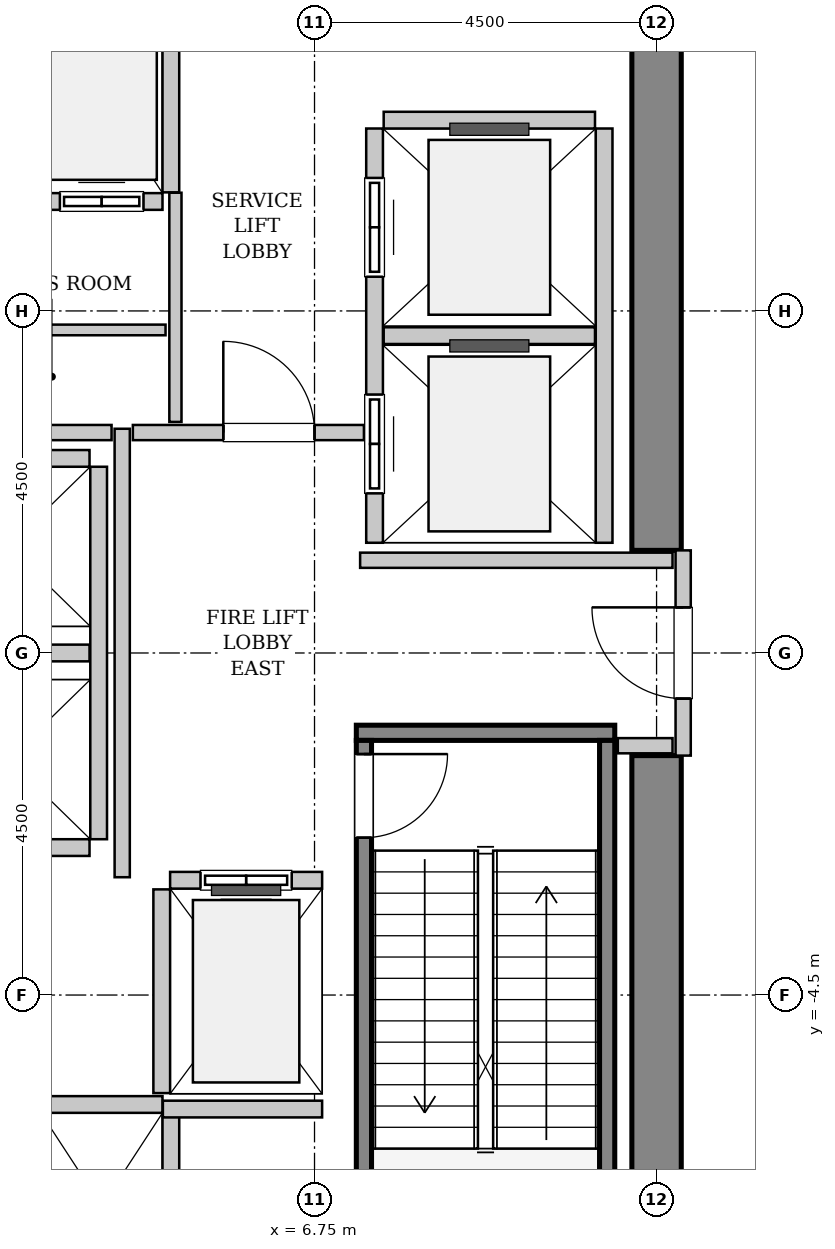
"""IFC4 building model, lengths in metres.
Left out: names, types, materials, properties, quantities, classifications, styles, units other than length and angle.
Written with IfcOpenShell. Run it as: python <this file> out.ifc"""

import sys

from ifc_helpers import new_model, si_unit, direction, frame, frame_2d, origin, place, context, subcontext, project, spatial, rectangle, extrude, source, transform, mapped, element, fill, save


model = new_model("IFC4")
c1 = context("Model", 3, precision=1e-05, world=origin(), true_north=direction((0.0, 1.0)))
c2 = subcontext(c1, "Body", "Model", "MODEL_VIEW")
j1 = project(units=[si_unit("LENGTHUNIT", "METRE"), si_unit("PLANEANGLEUNIT", "RADIAN")], contexts=[c1])
p1 = place(None, origin())
s1 = spatial("IfcSite", under=j1, at=p1, CompositionType="ELEMENT")
p2 = place(p1, origin())
s2 = spatial("IfcBuilding", under=s1, at=p2, CompositionType="ELEMENT")
p3 = place(p2, frame((0.0, 0.0, 22.2)))
s3 = spatial("IfcBuildingStorey", under=s2, at=p3, CompositionType="ELEMENT", Elevation=22.2)
m1 = source(origin(), c2, "Body", "SweptSolid", [
    extrude(rectangle(XDim=7.325, YDim=0.65, at=frame_2d((3.663, 0.0))), origin(), (0.0, 0.0, 1.0), 5.4),
])
for number, where, z_axis, x_axis in (
    (1, (11.25, -8.675, 0.0), (0.0, 0.0, 1.0), (0.0, 1.0, 0.0)),
    (2, (11.25, 1.35, 0.0), (0.0, 0.0, 1.0), (0.0, 1.0, 0.0)),
):
    element("IfcWall", number, at=place(p3, frame(where, z_axis=z_axis, x_axis=x_axis)), inside=s3, PredefinedType="SHEAR", context=c2, shape_type="MappedRepresentation", body=[
        mapped(m1, transform((0.0, 0.0, 0.0), x_axis=(1.0, 0.0, 0.0), y_axis=(0.0, 1.0, 0.0), z_axis=(0.0, 0.0, 1.0), scale=1.0)),
    ])
m2 = source(origin(), c2, "Body", "SweptSolid", [
    extrude(rectangle(XDim=3.4, YDim=0.2, at=frame_2d((1.7, 0.0))), origin(), (0.0, 0.0, 1.0), 5.4),
])
p4 = place(p3, frame((7.3, -1.05, 0.0), z_axis=(0.0, 0.0, 1.0), x_axis=(1.0, 0.0, 0.0)))
e3 = element("IfcWall", 3, at=p4, inside=s3, PredefinedType="SOLIDWALL", context=c2, shape_type="MappedRepresentation", body=[
    mapped(m2, transform((0.0, 0.0, 0.0), x_axis=(1.0, 0.0, 0.0), y_axis=(0.0, 1.0, 0.0), z_axis=(0.0, 0.0, 1.0), scale=1.0)),
])
m3 = source(origin(), c2, "Body", "SweptSolid", [
    extrude(rectangle(XDim=7.1, YDim=0.2, at=frame_2d((3.55, 0.0))), origin(), (0.0, 0.0, 1.0), 5.4),
])
p5 = place(p3, frame((7.4, -1.15, 0.0), z_axis=(0.0, 0.0, 1.0), x_axis=(0.0, -1.0, 0.0)))
e4 = element("IfcWall", 4, at=p5, inside=s3, PredefinedType="SOLIDWALL", context=c2, shape_type="MappedRepresentation", body=[
    mapped(m3, transform((0.0, 0.0, 0.0), x_axis=(1.0, 0.0, 0.0), y_axis=(0.0, 1.0, 0.0), z_axis=(0.0, 0.0, 1.0), scale=1.0)),
])
p6 = place(p5, frame((0.18, 0.0, 0.0)))
e5 = element("IfcOpeningElement", 5, at=p6, cuts=e4, PredefinedType="OPENING", context=c2, shape_type="SweptSolid", body=[
    extrude(rectangle(XDim=1.1, YDim=2.15, at=frame_2d((0.55, 1.075))), frame((0.0, 0.11, 0.0), z_axis=(0.0, -1.0, 0.0), x_axis=(1.0, 0.0, 0.0)), (0.0, 0.0, 1.0), 0.22),
])
p7 = place(p3, frame((10.6, -1.15, 0.0), z_axis=(0.0, 0.0, 1.0), x_axis=(0.0, -1.0, 0.0)))
e6 = element("IfcWall", 6, at=p7, inside=s3, PredefinedType="SOLIDWALL", context=c2, shape_type="MappedRepresentation", body=[
    mapped(m3, transform((0.0, 0.0, 0.0), x_axis=(1.0, 0.0, 0.0), y_axis=(0.0, 1.0, 0.0), z_axis=(0.0, 0.0, 1.0), scale=1.0)),
])
m4 = source(origin(), c2, "Body", "SweptSolid", [
    extrude(rectangle(XDim=2.0, YDim=0.22, at=frame_2d((1.0, 0.0))), origin(), (0.0, 0.0, 1.0), 4.905),
])
p8 = place(p3, frame((6.85, -2.99, 0.0), z_axis=(0.0, 0.0, 1.0), x_axis=(-1.0, 0.0, 0.0)))
e7 = element("IfcWall", 7, at=p8, inside=s3, PredefinedType="SOLIDWALL", context=c2, shape_type="MappedRepresentation", body=[
    mapped(m4, transform((0.0, 0.0, 0.0), x_axis=(1.0, 0.0, 0.0), y_axis=(0.0, 1.0, 0.0), z_axis=(0.0, 0.0, 1.0), scale=1.0)),
])
p9 = place(p8, frame((0.4, 0.0, 0.0)))
e8 = element("IfcOpeningElement", 8, at=p9, cuts=e7, PredefinedType="OPENING", context=c2, shape_type="SweptSolid", body=[
    extrude(rectangle(XDim=1.2, YDim=2.2, at=frame_2d((0.6, 1.1))), frame((0.0, 0.12, 0.0), z_axis=(0.0, -1.0, 0.0), x_axis=(1.0, 0.0, 0.0)), (0.0, 0.0, 1.0), 0.24),
])
m5 = source(origin(), c2, "Body", "SweptSolid", [
    extrude(rectangle(XDim=2.68, YDim=0.22, at=frame_2d((1.34, 0.0))), origin(), (0.0, 0.0, 1.0), 4.905),
])
p10 = place(p3, frame((4.74, -3.11, 0.0), z_axis=(0.0, 0.0, 1.0), x_axis=(0.0, -1.0, 0.0)))
e9 = element("IfcWall", 9, at=p10, inside=s3, PredefinedType="SOLIDWALL", context=c2, shape_type="MappedRepresentation", body=[
    mapped(m5, transform((0.0, 0.0, 0.0), x_axis=(1.0, 0.0, 0.0), y_axis=(0.0, 1.0, 0.0), z_axis=(0.0, 0.0, 1.0), scale=1.0)),
])
m6 = source(origin(), c2, "Body", "SweptSolid", [
    extrude(rectangle(XDim=5.45, YDim=0.22, at=frame_2d((2.725, 0.0))), origin(), (0.0, 0.0, 1.0), 4.905),
])
p11 = place(p3, frame((7.54, 6.9, 0.0), z_axis=(0.0, 0.0, 1.0), x_axis=(0.0, -1.0, 0.0)))
e10 = element("IfcWall", 10, at=p11, inside=s3, PredefinedType="SOLIDWALL", context=c2, shape_type="MappedRepresentation", body=[
    mapped(m6, transform((0.0, 0.0, 0.0), x_axis=(1.0, 0.0, 0.0), y_axis=(0.0, 1.0, 0.0), z_axis=(0.0, 0.0, 1.0), scale=1.0)),
])
p12 = place(p11, frame((3.5, 0.0, 0.0)))
e11 = element("IfcOpeningElement", 11, at=p12, cuts=e10, PredefinedType="OPENING", context=c2, shape_type="SweptSolid", body=[
    extrude(rectangle(XDim=1.3, YDim=2.3, at=frame_2d((0.65, 1.15))), frame((0.0, 0.12, 0.0), z_axis=(0.0, -1.0, 0.0), x_axis=(1.0, 0.0, 0.0)), (0.0, 0.0, 1.0), 0.24),
])
p13 = place(p11, frame((0.65, 0.0, 0.0)))
e12 = element("IfcOpeningElement", 12, at=p13, cuts=e10, PredefinedType="OPENING", context=c2, shape_type="SweptSolid", body=[
    extrude(rectangle(XDim=1.3, YDim=2.3, at=frame_2d((0.65, 1.15))), frame((0.0, 0.12, 0.0), z_axis=(0.0, -1.0, 0.0), x_axis=(1.0, 0.0, 0.0)), (0.0, 0.0, 1.0), 0.24),
])
p14 = place(p3, frame((10.56, 1.45, 0.0), z_axis=(0.0, 0.0, 1.0), x_axis=(0.0, 1.0, 0.0)))
e13 = element("IfcWall", 13, at=p14, inside=s3, PredefinedType="SOLIDWALL", context=c2, shape_type="MappedRepresentation", body=[
    mapped(m6, transform((0.0, 0.0, 0.0), x_axis=(1.0, 0.0, 0.0), y_axis=(0.0, 1.0, 0.0), z_axis=(0.0, 0.0, 1.0), scale=1.0)),
])
m7 = source(origin(), c2, "Body", "SweptSolid", [
    extrude(rectangle(XDim=2.78, YDim=0.22, at=frame_2d((1.39, 0.0))), origin(), (0.0, 0.0, 1.0), 4.905),
])
for number, where, z_axis, x_axis in (
    (14, (7.66, 4.175, 0.0), (0.0, 0.0, 1.0), (1.0, 0.0, 0.0)),
    (15, (10.44, 7.01, 0.0), (0.0, 0.0, 1.0), (-1.0, 0.0, 0.0)),
):
    element("IfcWall", number, at=place(p3, frame(where, z_axis=z_axis, x_axis=x_axis)), inside=s3, PredefinedType="SOLIDWALL", context=c2, shape_type="MappedRepresentation", body=[
        mapped(m7, transform((0.0, 0.0, 0.0), x_axis=(1.0, 0.0, 0.0), y_axis=(0.0, 1.0, 0.0), z_axis=(0.0, 0.0, 1.0), scale=1.0)),
    ])
m8 = source(origin(), c2, "Body", "SweptSolid", [
    extrude(rectangle(XDim=3.2, YDim=0.22, at=frame_2d((1.6, 0.0))), origin(), (0.0, 0.0, 1.0), 4.905),
])
p15 = place(p3, frame((1.55, 5.94, 0.0), z_axis=(0.0, 0.0, 1.0), x_axis=(1.0, 0.0, 0.0)))
e16 = element("IfcWall", 16, at=p15, inside=s3, PredefinedType="SOLIDWALL", context=c2, shape_type="MappedRepresentation", body=[
    mapped(m8, transform((0.0, 0.0, 0.0), x_axis=(1.0, 0.0, 0.0), y_axis=(0.0, 1.0, 0.0), z_axis=(0.0, 0.0, 1.0), scale=1.0)),
])
p16 = place(p15, frame((0.225, 0.0, 0.0)))
e17 = element("IfcOpeningElement", 17, at=p16, cuts=e16, PredefinedType="OPENING", context=c2, shape_type="SweptSolid", body=[
    extrude(rectangle(XDim=1.1, YDim=2.2, at=frame_2d((0.55, 1.1))), frame((0.0, 0.12, 0.0), z_axis=(0.0, -1.0, 0.0), x_axis=(1.0, 0.0, 0.0)), (0.0, 0.0, 1.0), 0.24),
])
p17 = place(p15, frame((1.85, 0.0, 0.0)))
e18 = element("IfcOpeningElement", 18, at=p17, cuts=e16, PredefinedType="OPENING", context=c2, shape_type="SweptSolid", body=[
    extrude(rectangle(XDim=1.1, YDim=2.2, at=frame_2d((0.55, 1.1))), frame((0.0, 0.12, 0.0), z_axis=(0.0, -1.0, 0.0), x_axis=(1.0, 0.0, 0.0)), (0.0, 0.0, 1.0), 0.24),
])
m9 = source(origin(), c2, "Body", "SweptSolid", [
    extrude(rectangle(XDim=2.43, YDim=0.22, at=frame_2d((1.215, 0.0))), origin(), (0.0, 0.0, 1.0), 4.905),
])
p18 = place(p3, frame((4.86, 6.06, 0.0), z_axis=(0.0, 0.0, 1.0), x_axis=(0.0, 1.0, 0.0)))
e19 = element("IfcWall", 19, at=p18, inside=s3, PredefinedType="SOLIDWALL", context=c2, shape_type="MappedRepresentation", body=[
    mapped(m9, transform((0.0, 0.0, 0.0), x_axis=(1.0, 0.0, 0.0), y_axis=(0.0, 1.0, 0.0), z_axis=(0.0, 0.0, 1.0), scale=1.0)),
])
p19 = place(p3, frame((4.75, -5.94, 0.0), z_axis=(0.0, 0.0, 1.0), x_axis=(-1.0, 0.0, 0.0)))
e20 = element("IfcWall", 20, at=p19, inside=s3, PredefinedType="SOLIDWALL", context=c2, shape_type="MappedRepresentation", body=[
    mapped(m8, transform((0.0, 0.0, 0.0), x_axis=(1.0, 0.0, 0.0), y_axis=(0.0, 1.0, 0.0), z_axis=(0.0, 0.0, 1.0), scale=1.0)),
])
p20 = place(p3, frame((4.86, -8.49, 0.0), z_axis=(0.0, 0.0, 1.0), x_axis=(0.0, 1.0, 0.0)))
e21 = element("IfcWall", 21, at=p20, inside=s3, PredefinedType="SOLIDWALL", context=c2, shape_type="MappedRepresentation", body=[
    mapped(m9, transform((0.0, 0.0, 0.0), x_axis=(1.0, 0.0, 0.0), y_axis=(0.0, 1.0, 0.0), z_axis=(0.0, 0.0, 1.0), scale=1.0)),
])
m10 = source(origin(), c2, "Body", "SweptSolid", [
    extrude(rectangle(XDim=4.9, YDim=0.22, at=frame_2d((2.45, 0.0))), origin(), (0.0, 0.0, 1.0), 4.905),
])
p21 = place(p3, frame((3.91, -2.45, 0.0), z_axis=(0.0, 0.0, 1.0), x_axis=(0.0, 1.0, 0.0)))
e22 = element("IfcWall", 22, at=p21, inside=s3, PredefinedType="SOLIDWALL", context=c2, shape_type="MappedRepresentation", body=[
    mapped(m10, transform((0.0, 0.0, 0.0), x_axis=(1.0, 0.0, 0.0), y_axis=(0.0, 1.0, 0.0), z_axis=(0.0, 0.0, 1.0), scale=1.0)),
])
m11 = source(origin(), c2, "Body", "SweptSolid", [
    extrude(rectangle(XDim=2.13, YDim=0.22, at=frame_2d((1.065, 0.0))), origin(), (0.0, 0.0, 1.0), 4.905),
])
for number, where, z_axis, x_axis in (
    (23, (1.66, -2.56, 0.0), (0.0, 0.0, 1.0), (1.0, 0.0, 0.0)),
    (24, (1.66, 0.0, 0.0), (0.0, 0.0, 1.0), (1.0, 0.0, 0.0)),
    (25, (3.79, 2.56, 0.0), (0.0, 0.0, 1.0), (-1.0, 0.0, 0.0)),
):
    element("IfcWall", number, at=place(p3, frame(where, z_axis=z_axis, x_axis=x_axis)), inside=s3, PredefinedType="SOLIDWALL", context=c2, shape_type="MappedRepresentation", body=[
        mapped(m11, transform((0.0, 0.0, 0.0), x_axis=(1.0, 0.0, 0.0), y_axis=(0.0, 1.0, 0.0), z_axis=(0.0, 0.0, 1.0), scale=1.0)),
    ])
m12 = source(origin(), c2, "Body", "SweptSolid", [
    extrude(rectangle(XDim=2.095, YDim=0.22, at=frame_2d((1.048, 0.0))), origin(), (0.0, 0.0, 1.0), 4.905),
])
p22 = place(p3, frame((4.755, -6.0, 0.0), z_axis=(0.0, 0.0, 1.0), x_axis=(1.0, 0.0, 0.0)))
e26 = element("IfcWall", 26, at=p22, inside=s3, PredefinedType="SOLIDWALL", context=c2, shape_type="MappedRepresentation", body=[
    mapped(m12, transform((0.0, 0.0, 0.0), x_axis=(1.0, 0.0, 0.0), y_axis=(0.0, 1.0, 0.0), z_axis=(0.0, 0.0, 1.0), scale=1.0)),
])
m13 = source(origin(), c2, "Body", "SweptSolid", [
    extrude(rectangle(XDim=2.7, YDim=0.2, at=frame_2d((1.35, 0.0))), origin(), (0.0, 0.0, 1.0), 3.795),
])
p23 = place(p3, frame((11.6, -1.35, 0.0), z_axis=(0.0, 0.0, 1.0), x_axis=(0.0, 1.0, 0.0)))
e27 = element("IfcWall", 27, at=p23, inside=s3, PredefinedType="PARTITIONING", context=c2, shape_type="MappedRepresentation", body=[
    mapped(m13, transform((0.0, 0.0, 0.0), x_axis=(1.0, 0.0, 0.0), y_axis=(0.0, 1.0, 0.0), z_axis=(0.0, 0.0, 1.0), scale=1.0)),
])
p24 = place(p23, frame((0.75, 0.0, 0.0)))
e28 = element("IfcOpeningElement", 28, at=p24, cuts=e27, PredefinedType="OPENING", context=c2, shape_type="SweptSolid", body=[
    extrude(rectangle(XDim=1.2, YDim=2.15, at=frame_2d((0.6, 1.075))), frame((0.0, 0.11, 0.0), z_axis=(0.0, -1.0, 0.0), x_axis=(1.0, 0.0, 0.0)), (0.0, 0.0, 1.0), 0.22),
])
m14 = source(origin(), c2, "Body", "SweptSolid", [
    extrude(rectangle(XDim=5.9, YDim=0.2, at=frame_2d((2.95, 0.0))), origin(), (0.0, 0.0, 1.0), 4.905),
])
p25 = place(p3, frame((4.22, -2.95, 0.0), z_axis=(0.0, 0.0, 1.0), x_axis=(0.0, 1.0, 0.0)))
e29 = element("IfcWall", 29, at=p25, inside=s3, PredefinedType="PARTITIONING", context=c2, shape_type="MappedRepresentation", body=[
    mapped(m14, transform((0.0, 0.0, 0.0), x_axis=(1.0, 0.0, 0.0), y_axis=(0.0, 1.0, 0.0), z_axis=(0.0, 0.0, 1.0), scale=1.0)),
])
m15 = source(origin(), c2, "Body", "SweptSolid", [
    extrude(rectangle(XDim=2.52, YDim=0.2, at=frame_2d((1.26, 0.0))), origin(), (0.0, 0.0, 1.0), 4.905),
])
p26 = place(p3, frame((1.56, 2.9, 0.0), z_axis=(0.0, 0.0, 1.0), x_axis=(1.0, 0.0, 0.0)))
e30 = element("IfcWall", 30, at=p26, inside=s3, PredefinedType="PARTITIONING", context=c2, shape_type="MappedRepresentation", body=[
    mapped(m15, transform((0.0, 0.0, 0.0), x_axis=(1.0, 0.0, 0.0), y_axis=(0.0, 1.0, 0.0), z_axis=(0.0, 0.0, 1.0), scale=1.0)),
])
m16 = source(origin(), c2, "Body", "SweptSolid", [
    extrude(rectangle(XDim=3.04, YDim=0.2, at=frame_2d((1.52, 0.0))), origin(), (0.0, 0.0, 1.0), 4.905),
])
p27 = place(p3, frame((4.36, 2.9, 0.0), z_axis=(0.0, 0.0, 1.0), x_axis=(1.0, 0.0, 0.0)))
e31 = element("IfcWall", 31, at=p27, inside=s3, PredefinedType="PARTITIONING", context=c2, shape_type="MappedRepresentation", body=[
    mapped(m16, transform((0.0, 0.0, 0.0), x_axis=(1.0, 0.0, 0.0), y_axis=(0.0, 1.0, 0.0), z_axis=(0.0, 0.0, 1.0), scale=1.0)),
])
p28 = place(p27, frame((1.19, 0.0, 0.0)))
e32 = element("IfcOpeningElement", 32, at=p28, cuts=e31, PredefinedType="OPENING", context=c2, shape_type="SweptSolid", body=[
    extrude(rectangle(XDim=1.2, YDim=2.15, at=frame_2d((0.6, 1.075))), frame((0.0, 0.11, 0.0), z_axis=(0.0, -1.0, 0.0), x_axis=(1.0, 0.0, 0.0)), (0.0, 0.0, 1.0), 0.22),
])
m17 = source(origin(), c2, "Body", "SweptSolid", [
    extrude(rectangle(XDim=4.11, YDim=0.2, at=frame_2d((2.055, 0.0))), origin(), (0.0, 0.0, 1.0), 4.905),
])
p29 = place(p3, frame((7.35, 1.22, 0.0), z_axis=(0.0, 0.0, 1.0), x_axis=(1.0, 0.0, 0.0)))
e33 = element("IfcWall", 33, at=p29, inside=s3, PredefinedType="PARTITIONING", context=c2, shape_type="MappedRepresentation", body=[
    mapped(m17, transform((0.0, 0.0, 0.0), x_axis=(1.0, 0.0, 0.0), y_axis=(0.0, 1.0, 0.0), z_axis=(0.0, 0.0, 1.0), scale=1.0)),
])
m18 = source(origin(), c2, "Body", "SweptSolid", [
    extrude(rectangle(XDim=0.72, YDim=0.2, at=frame_2d((0.36, 0.0))), origin(), (0.0, 0.0, 1.0), 4.905),
])
p30 = place(p3, frame((10.74, -1.22, 0.0), z_axis=(0.0, 0.0, 1.0), x_axis=(1.0, 0.0, 0.0)))
e34 = element("IfcWall", 34, at=p30, inside=s3, PredefinedType="PARTITIONING", context=c2, shape_type="MappedRepresentation", body=[
    mapped(m18, transform((0.0, 0.0, 0.0), x_axis=(1.0, 0.0, 0.0), y_axis=(0.0, 1.0, 0.0), z_axis=(0.0, 0.0, 1.0), scale=1.0)),
])
m19 = source(origin(), c2, "Body", "SweptSolid", [
    extrude(rectangle(XDim=3.015, YDim=0.16, at=frame_2d((1.507, 0.0))), origin(), (0.0, 0.0, 1.0), 4.905),
])
p31 = place(p3, frame((4.92, 3.04, 0.0), z_axis=(0.0, 0.0, 1.0), x_axis=(0.0, 1.0, 0.0)))
e35 = element("IfcWall", 35, at=p31, inside=s3, PredefinedType="PARTITIONING", context=c2, shape_type="MappedRepresentation", body=[
    mapped(m19, transform((0.0, 0.0, 0.0), x_axis=(1.0, 0.0, 0.0), y_axis=(0.0, 1.0, 0.0), z_axis=(0.0, 0.0, 1.0), scale=1.0)),
])
m20 = source(origin(), c2, "Body", "SweptSolid", [
    extrude(rectangle(XDim=3.15, YDim=0.14, at=frame_2d((1.575, 0.0))), origin(), (0.0, 0.0, 1.0), 4.905),
])
p32 = place(p3, frame((1.64, 4.25, 0.0), z_axis=(0.0, 0.0, 1.0), x_axis=(1.0, 0.0, 0.0)))
e36 = element("IfcWall", 36, at=p32, inside=s3, PredefinedType="PARTITIONING", context=c2, shape_type="MappedRepresentation", body=[
    mapped(m20, transform((0.0, 0.0, 0.0), x_axis=(1.0, 0.0, 0.0), y_axis=(0.0, 1.0, 0.0), z_axis=(0.0, 0.0, 1.0), scale=1.0)),
])
m21 = source(origin(), c2, "Body", "SweptSolid", [
    extrude(rectangle(XDim=1.1, YDim=2.15, at=frame_2d((0.55, 1.075))), frame((0.0, 0.025, 0.0), z_axis=(0.0, -1.0, 0.0), x_axis=(1.0, 0.0, 0.0)), (0.0, 0.0, 1.0), 0.05),
])
p33 = place(p6, origin())
e37 = element("IfcDoor", 37, at=p33, inside=s3, OperationType="SINGLE_SWING_LEFT", PredefinedType="DOOR", context=c2, shape_type="MappedRepresentation", body=[
    mapped(m21, transform((0.0, 0.0, 0.0), x_axis=(1.0, 0.0, 0.0), y_axis=(0.0, 1.0, 0.0), z_axis=(0.0, 0.0, 1.0), scale=1.0)),
])
fill(e5, e37)
m22 = source(origin(), c2, "Body", "SweptSolid", [
    extrude(rectangle(XDim=1.2, YDim=2.2, at=frame_2d((0.6, 1.1))), frame((0.0, 0.025, 0.0), z_axis=(0.0, -1.0, 0.0), x_axis=(1.0, 0.0, 0.0)), (0.0, 0.0, 1.0), 0.05),
])
p34 = place(p9, origin())
e38 = element("IfcDoor", 38, at=p34, inside=s3, OperationType="SLIDING_TO_LEFT", PredefinedType="DOOR", context=c2, shape_type="MappedRepresentation", body=[
    mapped(m22, transform((0.0, 0.0, 0.0), x_axis=(1.0, 0.0, 0.0), y_axis=(0.0, 1.0, 0.0), z_axis=(0.0, 0.0, 1.0), scale=1.0)),
])
fill(e8, e38)
m23 = source(origin(), c2, "Body", "SweptSolid", [
    extrude(rectangle(XDim=1.3, YDim=2.3, at=frame_2d((0.65, 1.15))), frame((0.0, 0.025, 0.0), z_axis=(0.0, -1.0, 0.0), x_axis=(1.0, 0.0, 0.0)), (0.0, 0.0, 1.0), 0.05),
])
p35 = place(p12, origin())
e39 = element("IfcDoor", 39, at=p35, inside=s3, OperationType="SLIDING_TO_RIGHT", PredefinedType="DOOR", context=c2, shape_type="MappedRepresentation", body=[
    mapped(m23, transform((0.0, 0.0, 0.0), x_axis=(1.0, 0.0, 0.0), y_axis=(0.0, 1.0, 0.0), z_axis=(0.0, 0.0, 1.0), scale=1.0)),
])
fill(e11, e39)
p36 = place(p13, origin())
e40 = element("IfcDoor", 40, at=p36, inside=s3, OperationType="SLIDING_TO_RIGHT", PredefinedType="DOOR", context=c2, shape_type="MappedRepresentation", body=[
    mapped(m23, transform((0.0, 0.0, 0.0), x_axis=(1.0, 0.0, 0.0), y_axis=(0.0, 1.0, 0.0), z_axis=(0.0, 0.0, 1.0), scale=1.0)),
])
fill(e12, e40)
m24 = source(origin(), c2, "Body", "SweptSolid", [
    extrude(rectangle(XDim=1.1, YDim=2.2, at=frame_2d((0.55, 1.1))), frame((0.0, 0.025, 0.0), z_axis=(0.0, -1.0, 0.0), x_axis=(1.0, 0.0, 0.0)), (0.0, 0.0, 1.0), 0.05),
])
p37 = place(p17, origin())
e41 = element("IfcDoor", 41, at=p37, inside=s3, OperationType="DOUBLE_DOOR_SLIDING", PredefinedType="DOOR", context=c2, shape_type="MappedRepresentation", body=[
    mapped(m24, transform((0.0, 0.0, 0.0), x_axis=(1.0, 0.0, 0.0), y_axis=(0.0, 1.0, 0.0), z_axis=(0.0, 0.0, 1.0), scale=1.0)),
])
fill(e18, e41)
m25 = source(origin(), c2, "Body", "SweptSolid", [
    extrude(rectangle(XDim=1.2, YDim=2.15, at=frame_2d((0.6, 1.075))), frame((0.0, 0.025, 0.0), z_axis=(0.0, -1.0, 0.0), x_axis=(1.0, 0.0, 0.0)), (0.0, 0.0, 1.0), 0.05),
])
p38 = place(p24, origin())
e42 = element("IfcDoor", 42, at=p38, inside=s3, OperationType="SINGLE_SWING_RIGHT", PredefinedType="DOOR", context=c2, shape_type="MappedRepresentation", body=[
    mapped(m25, transform((0.0, 0.0, 0.0), x_axis=(1.0, 0.0, 0.0), y_axis=(0.0, 1.0, 0.0), z_axis=(0.0, 0.0, 1.0), scale=1.0)),
])
fill(e28, e42)
p39 = place(p28, origin())
e43 = element("IfcDoor", 43, at=p39, inside=s3, OperationType="SINGLE_SWING_LEFT", PredefinedType="DOOR", context=c2, shape_type="MappedRepresentation", body=[
    mapped(m25, transform((0.0, 0.0, 0.0), x_axis=(1.0, 0.0, 0.0), y_axis=(0.0, 1.0, 0.0), z_axis=(0.0, 0.0, 1.0), scale=1.0)),
])
fill(e32, e43)
save(model, sys.argv[1])
